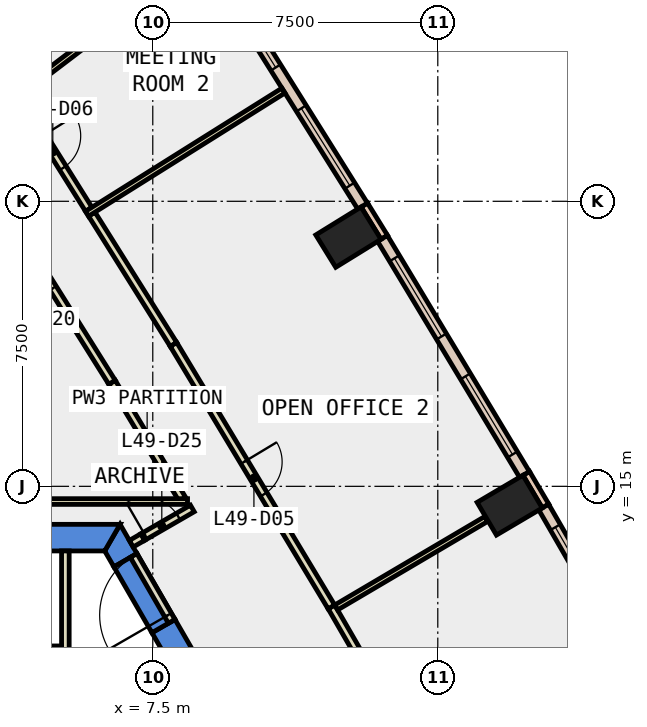
"""IFC4 building model, lengths in metres.
Left out: names, types, materials, properties, quantities, classifications, styles, units other than length and angle.
Written with IfcOpenShell. Run it as: python <this file> out.ifc"""

import sys

from ifc_helpers import new_model, si_unit, direction, frame, frame_2d, origin, origin_2d, place, context, subcontext, project, spatial, polyline, rectangle, outline, extrude, element, fill, save


model = new_model("IFC4")
c1 = context("Model", 3, precision=1e-05, world=origin(), true_north=direction((0.0, 1.0)))
c2 = subcontext(c1, "Body", "Model", "MODEL_VIEW")
j1 = project(units=[si_unit("LENGTHUNIT", "METRE"), si_unit("PLANEANGLEUNIT", "RADIAN")], contexts=[c1])
p1 = place(None, origin())
s1 = spatial("IfcSite", under=j1, at=p1, CompositionType="ELEMENT")
p2 = place(p1, origin())
s2 = spatial("IfcBuilding", under=s1, at=p2, CompositionType="ELEMENT")
p3 = place(p2, frame((0.0, 0.0, 219.2)))
s3 = spatial("IfcBuildingStorey", under=s2, at=p3, CompositionType="ELEMENT", Elevation=219.2)
for number, where, z_axis, x_axis in (
    (1, (16.892, 14.504, -0.4), (0.0, 0.0, 1.0), (-0.509, 0.861, 0.0)),
    (2, (12.648, 21.557, -0.4), (0.0, 0.0, 1.0), (-0.525, 0.851, 0.0)),
):
    element("IfcColumn", number, at=place(p3, frame(where, z_axis=z_axis, x_axis=x_axis)), inside=s3, PredefinedType="COLUMN", context=c2, shape_type="SweptSolid", body=[
        extrude(rectangle(XDim=1.0, YDim=1.4, at=origin_2d()), origin(), (0.0, 0.0, 1.0), 4.2),
    ])
p4 = place(p3, frame((0.0, 0.0, -0.4)))
e3 = element("IfcWall", 3, at=p4, inside=s3, PredefinedType="SHEAR", context=c2, shape_type="SweptSolid", body=[
    extrude(outline(polyline([(8.084, 11.498), (7.478, 11.148), (12.471, 2.5), (13.279, 2.5), (8.084, 11.498)])), origin(), (0.0, 0.0, 1.0), 4.2),
])
p5 = place(p3, frame((0.0, 0.0, -0.4)))
e4 = element("IfcWall", 4, at=p5, inside=s3, PredefinedType="SHEAR", context=c2, shape_type="SweptSolid", body=[
    extrude(outline(polyline([(6.478, 12.88), (7.084, 13.23), (6.64, 14.0), (6.235, 13.3), (6.478, 12.88)])), origin(), (0.0, 0.0, 1.0), 4.2),
])
p6 = place(p3, frame((0.0, 0.0, 3.6)))
e5 = element("IfcWall", 5, at=p6, inside=s3, PredefinedType="SHEAR", context=c2, shape_type="SweptSolid", body=[
    extrude(outline(polyline([(7.084, 13.23), (6.478, 12.88), (7.478, 11.148), (8.084, 11.498), (7.084, 13.23)])), origin(), (0.0, 0.0, 1.0), 0.2),
])
p7 = place(p3, frame((0.0, 0.0, -0.4)))
e6 = element("IfcWall", 6, at=p7, inside=s3, PredefinedType="SHEAR", context=c2, shape_type="SweptSolid", body=[
    extrude(outline(polyline([(6.64, 14.0), (-6.64, 14.0), (-6.235, 13.3), (6.235, 13.3), (6.64, 14.0)])), origin(), (0.0, 0.0, 1.0), 4.2),
])
p8 = place(p3, frame((17.835, 14.481, 0.0), z_axis=(0.0, 0.0, 1.0), x_axis=(-0.508161541526, 0.861261776531, 0.0)))
e7 = element("IfcWall", 7, at=p8, inside=s3, PredefinedType="STANDARD", context=c2, shape_type="SweptSolid", body=[
    extrude(rectangle(XDim=1.0, YDim=0.2, at=frame_2d((0.5, 0.0))), origin(), (0.0, 0.0, 1.0), 3.8),
])
p9 = place(p3, frame((13.592, 21.552, 0.0), z_axis=(0.0, 0.0, 1.0), x_axis=(-0.525825307325, 0.850592585306, 0.0)))
e8 = element("IfcWall", 8, at=p9, inside=s3, PredefinedType="STANDARD", context=c2, shape_type="SweptSolid", body=[
    extrude(rectangle(XDim=1.0, YDim=0.2, at=frame_2d((0.5, 0.0))), origin(), (0.0, 0.0, 1.0), 3.8),
])
p10 = place(p3, frame((21.411, 8.177, 0.0), z_axis=(0.0, 0.0, 1.0), x_axis=(-0.499968351115, 0.866043675505, 0.0)))
e9 = element("IfcWall", 9, at=p10, inside=s3, PredefinedType="STANDARD", context=c2, shape_type="SweptSolid", body=[
    extrude(rectangle(XDim=7.248, YDim=0.3, at=frame_2d((3.624, 0.0))), origin(), (0.0, 0.0, 1.0), 3.8),
])
p11 = place(p10, frame((0.612, 0.0, 0.9)))
e10 = element("IfcOpeningElement", 10, at=p11, cuts=e9, PredefinedType="OPENING", context=c2, shape_type="SweptSolid", body=[
    extrude(rectangle(XDim=2.4, YDim=2.6, at=frame_2d((1.2, 1.3))), frame((0.0, 0.16, 0.0), z_axis=(0.0, -1.0, 0.0), x_axis=(1.0, 0.0, 0.0)), (0.0, 0.0, 1.0), 0.32),
])
p12 = place(p10, frame((4.236, 0.0, 0.9)))
e11 = element("IfcOpeningElement", 11, at=p12, cuts=e9, PredefinedType="OPENING", context=c2, shape_type="SweptSolid", body=[
    extrude(rectangle(XDim=2.4, YDim=2.6, at=frame_2d((1.2, 1.3))), frame((0.0, 0.16, 0.0), z_axis=(0.0, -1.0, 0.0), x_axis=(1.0, 0.0, 0.0)), (0.0, 0.0, 1.0), 0.32),
])
p13 = place(p3, frame((17.281, 15.313, 0.0), z_axis=(0.0, 0.0, 1.0), x_axis=(-0.515560283412, 0.856853309597, 0.0)))
e12 = element("IfcWall", 12, at=p13, inside=s3, PredefinedType="STANDARD", context=c2, shape_type="SweptSolid", body=[
    extrude(rectangle(XDim=7.249, YDim=0.3, at=frame_2d((3.624, 0.0))), origin(), (0.0, 0.0, 1.0), 3.8),
])
p14 = place(p13, frame((0.612, 0.0, 0.9)))
e13 = element("IfcOpeningElement", 13, at=p14, cuts=e12, PredefinedType="OPENING", context=c2, shape_type="SweptSolid", body=[
    extrude(rectangle(XDim=2.4, YDim=2.6, at=frame_2d((1.2, 1.3))), frame((0.0, 0.16, 0.0), z_axis=(0.0, -1.0, 0.0), x_axis=(1.0, 0.0, 0.0)), (0.0, 0.0, 1.0), 0.32),
])
p15 = place(p13, frame((4.236, 0.0, 0.9)))
e14 = element("IfcOpeningElement", 14, at=p15, cuts=e12, PredefinedType="OPENING", context=c2, shape_type="SweptSolid", body=[
    extrude(rectangle(XDim=2.4, YDim=2.6, at=frame_2d((1.2, 1.3))), frame((0.0, 0.16, 0.0), z_axis=(0.0, -1.0, 0.0), x_axis=(1.0, 0.0, 0.0)), (0.0, 0.0, 1.0), 0.32),
])
p16 = place(p3, frame((13.021, 22.374, 0.0), z_axis=(0.0, 0.0, 1.0), x_axis=(-0.531239262679, 0.847221839773, 0.0)))
e15 = element("IfcWall", 15, at=p16, inside=s3, PredefinedType="STANDARD", context=c2, shape_type="SweptSolid", body=[
    extrude(rectangle(XDim=7.339, YDim=0.3, at=frame_2d((3.67, 0.0))), origin(), (0.0, 0.0, 1.0), 3.8),
])
p17 = place(p16, frame((0.635, 0.0, 0.9)))
e16 = element("IfcOpeningElement", 16, at=p17, cuts=e15, PredefinedType="OPENING", context=c2, shape_type="SweptSolid", body=[
    extrude(rectangle(XDim=2.4, YDim=2.6, at=frame_2d((1.2, 1.3))), frame((0.0, 0.16, 0.0), z_axis=(0.0, -1.0, 0.0), x_axis=(1.0, 0.0, 0.0)), (0.0, 0.0, 1.0), 0.32),
])
p18 = place(p16, frame((4.304, 0.0, 0.9)))
e17 = element("IfcOpeningElement", 17, at=p18, cuts=e15, PredefinedType="OPENING", context=c2, shape_type="SweptSolid", body=[
    extrude(rectangle(XDim=2.4, YDim=2.6, at=frame_2d((1.2, 1.3))), frame((0.0, 0.16, 0.0), z_axis=(0.0, -1.0, 0.0), x_axis=(1.0, 0.0, 0.0)), (0.0, 0.0, 1.0), 0.32),
])
p19 = place(p3, frame((6.934, 13.49, 0.0), z_axis=(0.0, 0.0, 1.0), x_axis=(0.865871789474, 0.500265973451, 0.0)))
e18 = element("IfcWall", 18, at=p19, inside=s3, PredefinedType="PARTITIONING", context=c2, shape_type="SweptSolid", body=[
    extrude(rectangle(XDim=0.35, YDim=0.2, at=frame_2d((0.175, 0.0))), origin(), (0.0, 0.0, 1.0), 2.4),
])
p20 = place(p3, frame((8.276, 14.664, 0.0), z_axis=(0.0, 0.0, 1.0), x_axis=(-0.515416266777, 0.85693994652, 0.0)))
e19 = element("IfcWall", 19, at=p20, inside=s3, PredefinedType="PARTITIONING", context=c2, shape_type="SweptSolid", body=[
    extrude(rectangle(XDim=3.587, YDim=0.2, at=frame_2d((1.793, 0.0))), origin(), (0.0, 0.0, 1.0), 3.8),
])
p21 = place(p3, frame((6.427, 17.738, 0.0), z_axis=(0.0, 0.0, 1.0), x_axis=(-0.531335643981, 0.847161397512, 0.0)))
e20 = element("IfcWall", 20, at=p21, inside=s3, PredefinedType="PARTITIONING", context=c2, shape_type="SweptSolid", body=[
    extrude(rectangle(XDim=7.647, YDim=0.2, at=frame_2d((3.823, 0.0))), origin(), (0.0, 0.0, 1.0), 3.8),
])
p22 = place(p21, frame((2.923, 0.0, 0.0)))
e21 = element("IfcOpeningElement", 21, at=p22, cuts=e20, PredefinedType="OPENING", context=c2, shape_type="SweptSolid", body=[
    extrude(rectangle(XDim=1.8, YDim=2.1, at=frame_2d((0.9, 1.05))), frame((0.0, 0.11, 0.0), z_axis=(0.0, -1.0, 0.0), x_axis=(1.0, 0.0, 0.0)), (0.0, 0.0, 1.0), 0.22),
])
p23 = place(p3, frame((12.202, 11.828, 0.0), z_axis=(0.0, 0.0, 1.0), x_axis=(0.499919823193, -0.866071688937, 0.0)))
e22 = element("IfcWall", 22, at=p23, inside=s3, PredefinedType="PARTITIONING", context=c2, shape_type="SweptSolid", body=[
    extrude(rectangle(XDim=8.209, YDim=0.2, at=frame_2d((4.104, 0.0))), origin(), (0.0, 0.0, 1.0), 3.8),
])
p24 = place(p23, frame((3.604, 0.0, 0.0)))
e23 = element("IfcOpeningElement", 23, at=p24, cuts=e22, PredefinedType="OPENING", context=c2, shape_type="SweptSolid", body=[
    extrude(rectangle(XDim=1.0, YDim=2.1, at=frame_2d((0.5, 1.05))), frame((0.0, 0.11, 0.0), z_axis=(0.0, -1.0, 0.0), x_axis=(1.0, 0.0, 0.0)), (0.0, 0.0, 1.0), 0.22),
])
p25 = place(p3, frame((5.895, 22.162, 0.0), z_axis=(0.0, 0.0, 1.0), x_axis=(0.531245023709, -0.847218227368, 0.0)))
e24 = element("IfcWall", 24, at=p25, inside=s3, PredefinedType="PARTITIONING", context=c2, shape_type="SweptSolid", body=[
    extrude(rectangle(XDim=4.049, YDim=0.2, at=frame_2d((2.024, 0.0))), origin(), (0.0, 0.0, 1.0), 3.8),
])
p26 = place(p3, frame((8.046, 18.732, 0.0), z_axis=(0.0, 0.0, 1.0), x_axis=(0.515502328211, -0.856888178007, 0.0)))
e25 = element("IfcWall", 25, at=p26, inside=s3, PredefinedType="PARTITIONING", context=c2, shape_type="SweptSolid", body=[
    extrude(rectangle(XDim=8.058, YDim=0.2, at=frame_2d((4.029, 0.0))), origin(), (0.0, 0.0, 1.0), 3.8),
])
p27 = place(p26, frame((3.604, 0.0, 0.0)))
e26 = element("IfcOpeningElement", 26, at=p27, cuts=e25, PredefinedType="OPENING", context=c2, shape_type="SweptSolid", body=[
    extrude(rectangle(XDim=1.0, YDim=2.1, at=frame_2d((0.5, 1.05))), frame((0.0, 0.11, 0.0), z_axis=(0.0, -1.0, 0.0), x_axis=(1.0, 0.0, 0.0)), (0.0, 0.0, 1.0), 0.22),
])
p28 = place(p3, frame((3.923, 25.307, 0.0), z_axis=(0.0, 0.0, 1.0), x_axis=(0.531150612982, -0.847277419934, 0.0)))
e27 = element("IfcWall", 27, at=p28, inside=s3, PredefinedType="PARTITIONING", context=c2, shape_type="SweptSolid", body=[
    extrude(rectangle(XDim=3.562, YDim=0.2, at=frame_2d((1.781, 0.0))), origin(), (0.0, 0.0, 1.0), 3.8),
])
p29 = place(p28, frame((1.281, 0.0, 0.0)))
e28 = element("IfcOpeningElement", 28, at=p29, cuts=e27, PredefinedType="OPENING", context=c2, shape_type="SweptSolid", body=[
    extrude(rectangle(XDim=1.0, YDim=2.1, at=frame_2d((0.5, 1.05))), frame((0.0, 0.11, 0.0), z_axis=(0.0, -1.0, 0.0), x_axis=(1.0, 0.0, 0.0)), (0.0, 0.0, 1.0), 0.22),
])
p30 = place(p3, frame((5.2, 13.3, 0.0), z_axis=(0.0, 0.0, 1.0), x_axis=(0.0, -1.0, 0.0)))
e29 = element("IfcWall", 29, at=p30, inside=s3, PredefinedType="PARTITIONING", context=c2, shape_type="SweptSolid", body=[
    extrude(rectangle(XDim=2.7, YDim=0.2, at=frame_2d((1.35, 0.0))), origin(), (0.0, 0.0, 1.0), 3.8),
])
p31 = place(p3, frame((5.1, 10.7, 0.0), z_axis=(0.0, 0.0, 1.0), x_axis=(-1.0, 0.0, 0.0)))
e30 = element("IfcWall", 30, at=p31, inside=s3, PredefinedType="PARTITIONING", context=c2, shape_type="SweptSolid", body=[
    extrude(rectangle(XDim=2.4, YDim=0.2, at=frame_2d((1.2, 0.0))), origin(), (0.0, 0.0, 1.0), 3.8),
])
p32 = place(p31, frame((0.75, 0.0, 0.0)))
e31 = element("IfcOpeningElement", 31, at=p32, cuts=e30, PredefinedType="OPENING", context=c2, shape_type="SweptSolid", body=[
    extrude(rectangle(XDim=0.9, YDim=2.1, at=frame_2d((0.45, 1.05))), frame((0.0, 0.11, 0.0), z_axis=(0.0, -1.0, 0.0), x_axis=(1.0, 0.0, 0.0)), (0.0, 0.0, 1.0), 0.22),
])
p33 = place(p3, frame((8.415, 14.6, 0.0), z_axis=(0.0, 0.0, 1.0), x_axis=(-1.0, 0.0, 0.0)))
e32 = element("IfcWall", 32, at=p33, inside=s3, PredefinedType="PARTITIONING", context=c2, shape_type="SweptSolid", body=[
    extrude(rectangle(XDim=8.015, YDim=0.15, at=frame_2d((4.008, 0.0))), origin(), (0.0, 0.0, 1.0), 3.8),
])
p34 = place(p3, frame((12.326, 11.813, 0.0), z_axis=(0.0, 0.0, 1.0), x_axis=(0.861428100003, 0.507879541353, 0.0)))
e33 = element("IfcWall", 33, at=p34, inside=s3, PredefinedType="PARTITIONING", context=c2, shape_type="SweptSolid", body=[
    extrude(rectangle(XDim=4.58, YDim=0.15, at=frame_2d((2.29, 0.0))), origin(), (0.0, 0.0, 1.0), 3.8),
])
p35 = place(p3, frame((5.77, 22.172, 0.0), z_axis=(0.0, 0.0, 1.0), x_axis=(0.847187879248, 0.531293419171, 0.0)))
e34 = element("IfcWall", 34, at=p35, inside=s3, PredefinedType="PARTITIONING", context=c2, shape_type="SweptSolid", body=[
    extrude(rectangle(XDim=6.1, YDim=0.15, at=frame_2d((3.05, 0.0))), origin(), (0.0, 0.0, 1.0), 3.8),
])
p36 = place(p3, frame((3.856, 25.225, 0.0), z_axis=(0.0, 0.0, 1.0), x_axis=(0.795987848728, 0.605312600792, 0.0)))
e35 = element("IfcWall", 35, at=p36, inside=s3, PredefinedType="PARTITIONING", context=c2, shape_type="SweptSolid", body=[
    extrude(rectangle(XDim=4.804, YDim=0.15, at=frame_2d((2.402, 0.0))), origin(), (0.0, 0.0, 1.0), 3.8),
])
p37 = place(p3, frame((7.997, 11.448, 0.0), z_axis=(0.0, 0.0, 1.0), x_axis=(-0.50002537861, 0.866010750942, 0.0)))
e36 = element("IfcWall", 36, at=p37, inside=s3, PredefinedType="PARTITIONING", context=c2, shape_type="SweptSolid", body=[
    extrude(rectangle(XDim=2.0, YDim=0.2, at=frame_2d((1.0, 0.0))), origin(), (0.0, 0.0, 1.0), 2.4),
])
p38 = place(p37, frame((0.19, 0.0, 0.0)))
e37 = element("IfcOpeningElement", 37, at=p38, cuts=e36, PredefinedType="OPENING", context=c2, shape_type="SweptSolid", body=[
    extrude(rectangle(XDim=1.8, YDim=2.1, at=frame_2d((0.9, 1.05))), frame((0.0, 0.11, 0.0), z_axis=(0.0, -1.0, 0.0), x_axis=(1.0, 0.0, 0.0)), (0.0, 0.0, 1.0), 0.22),
])
p39 = place(p3, frame((7.237, 13.665, 0.0), z_axis=(0.0, 0.0, 1.0), x_axis=(0.865999269783, 0.500045262687, 0.0)))
e38 = element("IfcWall", 38, at=p39, inside=s3, PredefinedType="PARTITIONING", context=c2, shape_type="SweptSolid", body=[
    extrude(rectangle(XDim=1.506, YDim=0.2, at=frame_2d((0.753, 0.0))), origin(), (0.0, 0.0, 1.0), 3.8),
])
p40 = place(p39, frame((0.078, 0.0, 0.0)))
e39 = element("IfcOpeningElement", 39, at=p40, cuts=e38, PredefinedType="OPENING", context=c2, shape_type="SweptSolid", body=[
    extrude(rectangle(XDim=1.0, YDim=2.1, at=frame_2d((0.5, 1.05))), frame((0.0, 0.11, 0.0), z_axis=(0.0, -1.0, 0.0), x_axis=(1.0, 0.0, 0.0)), (0.0, 0.0, 1.0), 0.22),
])
p41 = place(p12, origin())
e40 = element("IfcWindow", 40, at=p41, inside=s3, PartitioningType="SINGLE_PANEL", PredefinedType="WINDOW", context=c2, shape_type="SweptSolid", body=[
    extrude(rectangle(XDim=2.4, YDim=2.6, at=frame_2d((1.2, 1.3))), frame((0.0, 0.03, 0.0), z_axis=(0.0, -1.0, 0.0), x_axis=(1.0, 0.0, 0.0)), (0.0, 0.0, 1.0), 0.06),
])
fill(e11, e40)
p42 = place(p14, origin())
e41 = element("IfcWindow", 41, at=p42, inside=s3, PartitioningType="SINGLE_PANEL", PredefinedType="WINDOW", context=c2, shape_type="SweptSolid", body=[
    extrude(rectangle(XDim=2.4, YDim=2.6, at=frame_2d((1.2, 1.3))), frame((0.0, 0.03, 0.0), z_axis=(0.0, -1.0, 0.0), x_axis=(1.0, 0.0, 0.0)), (0.0, 0.0, 1.0), 0.06),
])
fill(e13, e41)
p43 = place(p15, origin())
e42 = element("IfcWindow", 42, at=p43, inside=s3, PartitioningType="SINGLE_PANEL", PredefinedType="WINDOW", context=c2, shape_type="SweptSolid", body=[
    extrude(rectangle(XDim=2.4, YDim=2.6, at=frame_2d((1.2, 1.3))), frame((0.0, 0.03, 0.0), z_axis=(0.0, -1.0, 0.0), x_axis=(1.0, 0.0, 0.0)), (0.0, 0.0, 1.0), 0.06),
])
fill(e14, e42)
p44 = place(p17, origin())
e43 = element("IfcWindow", 43, at=p44, inside=s3, PartitioningType="SINGLE_PANEL", PredefinedType="WINDOW", context=c2, shape_type="SweptSolid", body=[
    extrude(rectangle(XDim=2.4, YDim=2.6, at=frame_2d((1.2, 1.3))), frame((0.0, 0.03, 0.0), z_axis=(0.0, -1.0, 0.0), x_axis=(1.0, 0.0, 0.0)), (0.0, 0.0, 1.0), 0.06),
])
fill(e16, e43)
p45 = place(p18, origin())
e44 = element("IfcWindow", 44, at=p45, inside=s3, PartitioningType="SINGLE_PANEL", PredefinedType="WINDOW", context=c2, shape_type="SweptSolid", body=[
    extrude(rectangle(XDim=2.4, YDim=2.6, at=frame_2d((1.2, 1.3))), frame((0.0, 0.03, 0.0), z_axis=(0.0, -1.0, 0.0), x_axis=(1.0, 0.0, 0.0)), (0.0, 0.0, 1.0), 0.06),
])
fill(e17, e44)
p46 = place(p27, origin())
e45 = element("IfcDoor", 45, at=p46, inside=s3, OperationType="SINGLE_SWING_RIGHT", PredefinedType="DOOR", context=c2, shape_type="SweptSolid", body=[
    extrude(rectangle(XDim=1.0, YDim=2.1, at=frame_2d((0.5, 1.05))), frame((0.0, 0.025, 0.0), z_axis=(0.0, -1.0, 0.0), x_axis=(1.0, 0.0, 0.0)), (0.0, 0.0, 1.0), 0.05),
])
fill(e26, e45)
p47 = place(p29, origin())
e46 = element("IfcDoor", 46, at=p47, inside=s3, OperationType="SINGLE_SWING_LEFT", PredefinedType="DOOR", context=c2, shape_type="SweptSolid", body=[
    extrude(rectangle(XDim=1.0, YDim=2.1, at=frame_2d((0.5, 1.05))), frame((0.0, 0.025, 0.0), z_axis=(0.0, -1.0, 0.0), x_axis=(1.0, 0.0, 0.0)), (0.0, 0.0, 1.0), 0.05),
])
fill(e28, e46)
p48 = place(p22, origin())
e47 = element("IfcDoor", 47, at=p48, inside=s3, OperationType="DOUBLE_DOOR_SINGLE_SWING", PredefinedType="DOOR", context=c2, shape_type="SweptSolid", body=[
    extrude(rectangle(XDim=1.8, YDim=2.1, at=frame_2d((0.9, 1.05))), frame((0.0, 0.025, 0.0), z_axis=(0.0, -1.0, 0.0), x_axis=(1.0, 0.0, 0.0)), (0.0, 0.0, 1.0), 0.05),
])
fill(e21, e47)
p49 = place(p40, origin())
e48 = element("IfcDoor", 48, at=p49, inside=s3, OperationType="SINGLE_SWING_LEFT", PredefinedType="DOOR", context=c2, shape_type="SweptSolid", body=[
    extrude(rectangle(XDim=1.0, YDim=2.1, at=frame_2d((0.5, 1.05))), frame((0.0, 0.025, 0.0), z_axis=(0.0, -1.0, 0.0), x_axis=(1.0, 0.0, 0.0)), (0.0, 0.0, 1.0), 0.05),
])
fill(e39, e48)
p50 = place(p38, origin())
e49 = element("IfcDoor", 49, at=p50, inside=s3, OperationType="DOUBLE_DOOR_SINGLE_SWING", PredefinedType="DOOR", context=c2, shape_type="SweptSolid", body=[
    extrude(rectangle(XDim=1.8, YDim=2.1, at=frame_2d((0.9, 1.05))), frame((0.0, 0.025, 0.0), z_axis=(0.0, -1.0, 0.0), x_axis=(1.0, 0.0, 0.0)), (0.0, 0.0, 1.0), 0.05),
])
fill(e37, e49)
save(model, sys.argv[1])
